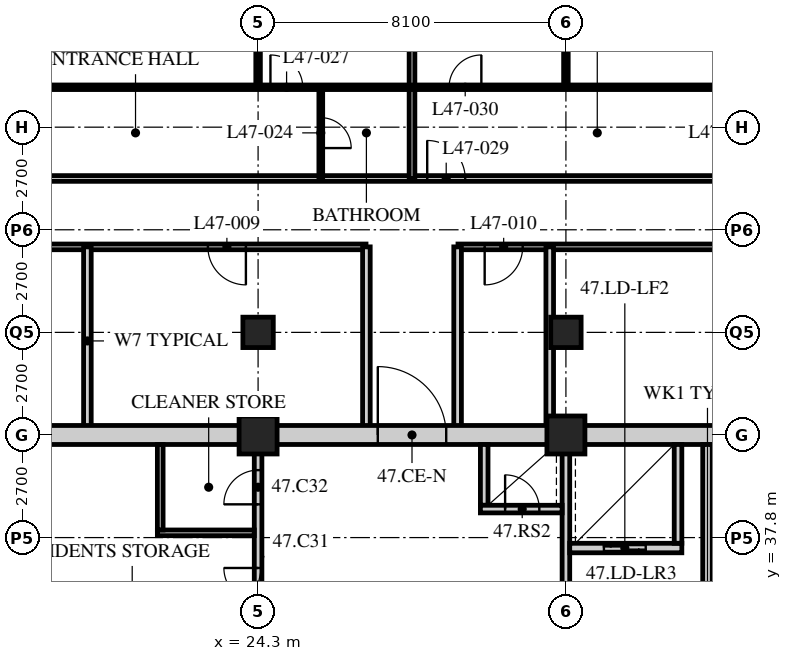
"""IFC4 building model, lengths in metres.
Left out: names, types, materials, properties, quantities, classifications, styles, units other than length and angle.
Written with IfcOpenShell. Run it as: python <this file> out.ifc"""

import sys

from ifc_helpers import new_model, si_unit, direction, frame, frame_2d, origin, origin_2d, place, context, subcontext, project, spatial, rectangle, hollow_rectangle, extrude, element, fill, save


model = new_model("IFC4")
c1 = context("Model", 3, precision=1e-05, world=origin(), true_north=direction((0.0, 1.0)))
c2 = subcontext(c1, "Body", "Model", "MODEL_VIEW")
j1 = project(units=[si_unit("LENGTHUNIT", "METRE"), si_unit("PLANEANGLEUNIT", "RADIAN")], contexts=[c1])
p1 = place(None, origin())
s1 = spatial("IfcSite", under=j1, at=p1, CompositionType="ELEMENT")
p2 = place(p1, origin())
s2 = spatial("IfcBuilding", under=s1, at=p2, CompositionType="ELEMENT")
p3 = place(p2, frame((0.0, 0.0, 184.8)))
s3 = spatial("IfcBuildingStorey", under=s2, at=p3, CompositionType="ELEMENT", Elevation=184.8)
p4 = place(p3, frame((24.3, 40.5, 0.0), z_axis=(0.0, 0.0, 1.0), x_axis=(1.0, 0.0, 0.0)))
e1 = element("IfcColumn", 1, at=p4, inside=s3, PredefinedType="COLUMN", context=c2, shape_type="SweptSolid", body=[
    extrude(hollow_rectangle(XDim=1.0, YDim=1.0, WallThickness=0.1, at=origin_2d()), origin(), (0.0, 0.0, 1.0), 3.6),
])
p5 = place(p3, frame((24.3, 43.2, 0.0), z_axis=(0.0, 0.0, 1.0), x_axis=(1.0, 0.0, 0.0)))
e2 = element("IfcColumn", 2, at=p5, inside=s3, PredefinedType="COLUMN", context=c2, shape_type="SweptSolid", body=[
    extrude(hollow_rectangle(XDim=0.8, YDim=0.8, WallThickness=0.08, at=origin_2d()), origin(), (0.0, 0.0, 1.0), 3.6),
])
p6 = place(p3, frame((32.4, 40.5, 0.0), z_axis=(0.0, 0.0, 1.0), x_axis=(1.0, 0.0, 0.0)))
e3 = element("IfcColumn", 3, at=p6, inside=s3, PredefinedType="COLUMN", context=c2, shape_type="SweptSolid", body=[
    extrude(hollow_rectangle(XDim=1.0, YDim=1.0, WallThickness=0.1, at=origin_2d()), origin(), (0.0, 0.0, 1.0), 3.6),
])
p7 = place(p3, frame((32.4, 43.2, 0.0), z_axis=(0.0, 0.0, 1.0), x_axis=(1.0, 0.0, 0.0)))
e4 = element("IfcColumn", 4, at=p7, inside=s3, PredefinedType="COLUMN", context=c2, shape_type="SweptSolid", body=[
    extrude(hollow_rectangle(XDim=0.8, YDim=0.8, WallThickness=0.08, at=origin_2d()), origin(), (0.0, 0.0, 1.0), 3.6),
])
p8 = place(p3, frame((12.15, 47.25, 0.0), z_axis=(0.0, 0.0, 1.0), x_axis=(1.0, 0.0, 0.0)))
e5 = element("IfcWall", 5, at=p8, inside=s3, PredefinedType="PARTITIONING", context=c2, shape_type="SweptSolid", body=[
    extrude(rectangle(XDim=32.4, YDim=0.15, at=frame_2d((16.2, 0.0))), origin(), (0.0, 0.0, 1.0), 3.39),
])
p9 = place(p8, frame((4.45, 0.0, 0.0)))
e6 = element("IfcOpeningElement", 6, at=p9, cuts=e5, PredefinedType="OPENING", context=c2, shape_type="SweptSolid", body=[
    extrude(rectangle(XDim=1.0, YDim=2.1, at=frame_2d((0.5, 1.05))), frame((0.0, 0.085, 0.0), z_axis=(0.0, -1.0, 0.0), x_axis=(1.0, 0.0, 0.0)), (0.0, 0.0, 1.0), 0.17),
])
p10 = place(p8, frame((16.6, 0.0, 0.0)))
e7 = element("IfcOpeningElement", 7, at=p10, cuts=e5, PredefinedType="OPENING", context=c2, shape_type="SweptSolid", body=[
    extrude(rectangle(XDim=1.0, YDim=2.1, at=frame_2d((0.5, 1.05))), frame((0.0, 0.085, 0.0), z_axis=(0.0, -1.0, 0.0), x_axis=(1.0, 0.0, 0.0)), (0.0, 0.0, 1.0), 0.17),
])
p11 = place(p8, frame((29.875, 0.0, 0.0)))
e8 = element("IfcOpeningElement", 8, at=p11, cuts=e5, PredefinedType="OPENING", context=c2, shape_type="SweptSolid", body=[
    extrude(rectangle(XDim=1.0, YDim=2.1, at=frame_2d((0.5, 1.05))), frame((0.0, 0.085, 0.0), z_axis=(0.0, -1.0, 0.0), x_axis=(1.0, 0.0, 0.0)), (0.0, 0.0, 1.0), 0.17),
])
p12 = place(p8, frame((1.525, 0.0, 0.0)))
e9 = element("IfcOpeningElement", 9, at=p12, cuts=e5, PredefinedType="OPENING", context=c2, shape_type="SweptSolid", body=[
    extrude(rectangle(XDim=1.0, YDim=2.1, at=frame_2d((0.5, 1.05))), frame((0.0, 0.085, 0.0), z_axis=(0.0, -1.0, 0.0), x_axis=(1.0, 0.0, 0.0)), (0.0, 0.0, 1.0), 0.17),
])
p13 = place(p3, frame((42.75, 45.45, 0.0), z_axis=(0.0, 0.0, 1.0), x_axis=(-1.0, 0.0, 0.0)))
e10 = element("IfcWall", 10, at=p13, inside=s3, PredefinedType="PARTITIONING", context=c2, shape_type="SweptSolid", body=[
    extrude(rectangle(XDim=13.19, YDim=0.15, at=frame_2d((6.595, 0.0))), origin(), (0.0, 0.0, 1.0), 3.39),
])
p14 = place(p13, frame((11.488, 0.0, 0.0)))
e11 = element("IfcOpeningElement", 11, at=p14, cuts=e10, PredefinedType="OPENING", context=c2, shape_type="SweptSolid", body=[
    extrude(rectangle(XDim=1.0, YDim=2.1, at=frame_2d((0.5, 1.05))), frame((0.0, 0.085, 0.0), z_axis=(0.0, -1.0, 0.0), x_axis=(1.0, 0.0, 0.0)), (0.0, 0.0, 1.0), 0.17),
])
p15 = place(p13, frame((4.888, 0.0, 0.0)))
e12 = element("IfcOpeningElement", 12, at=p15, cuts=e10, PredefinedType="OPENING", context=c2, shape_type="SweptSolid", body=[
    extrude(rectangle(XDim=1.0, YDim=2.1, at=frame_2d((0.5, 1.05))), frame((0.0, 0.085, 0.0), z_axis=(0.0, -1.0, 0.0), x_axis=(1.0, 0.0, 0.0)), (0.0, 0.0, 1.0), 0.17),
])
p16 = place(p3, frame((27.14, 45.45, 0.0), z_axis=(0.0, 0.0, 1.0), x_axis=(-1.0, 0.0, 0.0)))
e13 = element("IfcWall", 13, at=p16, inside=s3, PredefinedType="PARTITIONING", context=c2, shape_type="SweptSolid", body=[
    extrude(rectangle(XDim=13.19, YDim=0.15, at=frame_2d((6.595, 0.0))), origin(), (0.0, 0.0, 1.0), 3.39),
])
p17 = place(p16, frame((9.761, 0.0, 0.0)))
e14 = element("IfcOpeningElement", 14, at=p17, cuts=e13, PredefinedType="OPENING", context=c2, shape_type="SweptSolid", body=[
    extrude(rectangle(XDim=1.0, YDim=2.1, at=frame_2d((0.5, 1.05))), frame((0.0, 0.085, 0.0), z_axis=(0.0, -1.0, 0.0), x_axis=(1.0, 0.0, 0.0)), (0.0, 0.0, 1.0), 0.17),
])
p18 = place(p16, frame((3.161, 0.0, 0.0)))
e15 = element("IfcOpeningElement", 15, at=p18, cuts=e13, PredefinedType="OPENING", context=c2, shape_type="SweptSolid", body=[
    extrude(rectangle(XDim=1.0, YDim=2.1, at=frame_2d((0.5, 1.05))), frame((0.0, 0.085, 0.0), z_axis=(0.0, -1.0, 0.0), x_axis=(1.0, 0.0, 0.0)), (0.0, 0.0, 1.0), 0.17),
])
p19 = place(p3, frame((19.809, 45.45, 0.0), z_axis=(0.0, 0.0, 1.0), x_axis=(0.0, -1.0, 0.0)))
e16 = element("IfcWall", 16, at=p19, inside=s3, PredefinedType="SOLIDWALL", context=c2, shape_type="SweptSolid", body=[
    extrude(rectangle(XDim=4.95, YDim=0.2, at=frame_2d((2.475, 0.0))), origin(), (0.0, 0.0, 1.0), 3.39),
])
p20 = place(p3, frame((31.974, 45.45, 0.0), z_axis=(0.0, 0.0, 1.0), x_axis=(0.0, -1.0, 0.0)))
e17 = element("IfcWall", 17, at=p20, inside=s3, PredefinedType="SOLIDWALL", context=c2, shape_type="SweptSolid", body=[
    extrude(rectangle(XDim=4.95, YDim=0.2, at=frame_2d((2.475, 0.0))), origin(), (0.0, 0.0, 1.0), 2.69),
])
for number, where, z_axis, x_axis in (
    (18, (27.15, 40.5, 0.0), (0.0, 0.0, 1.0), (0.0, 1.0, 0.0)),
    (19, (29.55, 40.5, 0.0), (0.0, 0.0, 1.0), (0.0, 1.0, 0.0)),
):
    element("IfcWall", number, at=place(p3, frame(where, z_axis=z_axis, x_axis=x_axis)), inside=s3, PredefinedType="SOLIDWALL", context=c2, shape_type="SweptSolid", body=[
        extrude(rectangle(XDim=4.95, YDim=0.2, at=frame_2d((2.475, 0.0))), origin(), (0.0, 0.0, 1.0), 3.39),
    ])
p21 = place(p3, frame((25.95, 47.25, 0.0), z_axis=(0.0, 0.0, 1.0), x_axis=(0.0, 1.0, 0.0)))
e20 = element("IfcWall", 20, at=p21, inside=s3, PredefinedType="PARTITIONING", context=c2, shape_type="SweptSolid", body=[
    extrude(rectangle(XDim=2.4, YDim=0.1, at=frame_2d((1.2, 0.0))), origin(), (0.0, 0.0, 1.0), 3.39),
])
p22 = place(p21, frame((0.8, 0.0, 0.0)))
e21 = element("IfcOpeningElement", 21, at=p22, cuts=e20, PredefinedType="OPENING", context=c2, shape_type="SweptSolid", body=[
    extrude(rectangle(XDim=0.8, YDim=2.1, at=frame_2d((0.4, 1.05))), frame((0.0, 0.06, 0.0), z_axis=(0.0, -1.0, 0.0), x_axis=(1.0, 0.0, 0.0)), (0.0, 0.0, 1.0), 0.12),
])
p23 = place(p3, frame((24.3, 49.65, 0.0), z_axis=(0.0, 0.0, 1.0), x_axis=(0.0, 1.0, 0.0)))
e22 = element("IfcWall", 22, at=p23, inside=s3, PredefinedType="PARTITIONING", context=c2, shape_type="SweptSolid", body=[
    extrude(rectangle(XDim=9.45, YDim=0.12, at=frame_2d((4.725, 0.0))), origin(), (0.0, 0.0, 1.0), 2.778),
])
p24 = place(p3, frame((28.35, 47.25, 0.0), z_axis=(0.0, 0.0, 1.0), x_axis=(0.0, 1.0, 0.0)))
e23 = element("IfcWall", 23, at=p24, inside=s3, PredefinedType="PARTITIONING", context=c2, shape_type="SweptSolid", body=[
    extrude(rectangle(XDim=11.85, YDim=0.15, at=frame_2d((5.925, 0.0))), origin(), (0.0, 0.0, 1.0), 3.39),
])
p25 = place(p3, frame((8.15, 49.65, 0.0), z_axis=(0.0, 0.0, 1.0), x_axis=(1.0, 0.0, 0.0)))
e24 = element("IfcWall", 24, at=p25, inside=s3, PredefinedType="PARTITIONING", context=c2, shape_type="SweptSolid", body=[
    extrude(rectangle(XDim=40.4, YDim=0.12, at=frame_2d((20.2, 0.0))), origin(), (0.0, 0.0, 1.0), 3.39),
])
p26 = place(p25, frame((9.025, 0.0, 0.0)))
e25 = element("IfcOpeningElement", 25, at=p26, cuts=e24, PredefinedType="OPENING", context=c2, shape_type="SweptSolid", body=[
    extrude(rectangle(XDim=0.85, YDim=2.1, at=frame_2d((0.425, 1.05))), frame((0.0, 0.07, 0.0), z_axis=(0.0, -1.0, 0.0), x_axis=(1.0, 0.0, 0.0)), (0.0, 0.0, 1.0), 0.14),
])
p27 = place(p25, frame((16.475, 0.0, 0.0)))
e26 = element("IfcOpeningElement", 26, at=p27, cuts=e24, PredefinedType="OPENING", context=c2, shape_type="SweptSolid", body=[
    extrude(rectangle(XDim=0.85, YDim=2.1, at=frame_2d((0.425, 1.05))), frame((0.0, 0.07, 0.0), z_axis=(0.0, -1.0, 0.0), x_axis=(1.0, 0.0, 0.0)), (0.0, 0.0, 1.0), 0.14),
])
p28 = place(p25, frame((21.175, 0.0, 0.0)))
e27 = element("IfcOpeningElement", 27, at=p28, cuts=e24, PredefinedType="OPENING", context=c2, shape_type="SweptSolid", body=[
    extrude(rectangle(XDim=0.85, YDim=2.1, at=frame_2d((0.425, 1.05))), frame((0.0, 0.07, 0.0), z_axis=(0.0, -1.0, 0.0), x_axis=(1.0, 0.0, 0.0)), (0.0, 0.0, 1.0), 0.14),
])
p29 = place(p25, frame((28.625, 0.0, 0.0)))
e28 = element("IfcOpeningElement", 28, at=p29, cuts=e24, PredefinedType="OPENING", context=c2, shape_type="SweptSolid", body=[
    extrude(rectangle(XDim=0.85, YDim=2.1, at=frame_2d((0.425, 1.05))), frame((0.0, 0.07, 0.0), z_axis=(0.0, -1.0, 0.0), x_axis=(1.0, 0.0, 0.0)), (0.0, 0.0, 1.0), 0.14),
])
p30 = place(p25, frame((32.825, 0.0, 0.0)))
e29 = element("IfcOpeningElement", 29, at=p30, cuts=e24, PredefinedType="OPENING", context=c2, shape_type="SweptSolid", body=[
    extrude(rectangle(XDim=0.85, YDim=2.1, at=frame_2d((0.425, 1.05))), frame((0.0, 0.07, 0.0), z_axis=(0.0, -1.0, 0.0), x_axis=(1.0, 0.0, 0.0)), (0.0, 0.0, 1.0), 0.14),
])
p31 = place(p25, frame((36.675, 0.0, 0.0)))
e30 = element("IfcOpeningElement", 30, at=p31, cuts=e24, PredefinedType="OPENING", context=c2, shape_type="SweptSolid", body=[
    extrude(rectangle(XDim=0.85, YDim=2.1, at=frame_2d((0.425, 1.05))), frame((0.0, 0.07, 0.0), z_axis=(0.0, -1.0, 0.0), x_axis=(1.0, 0.0, 0.0)), (0.0, 0.0, 1.0), 0.14),
])
p32 = place(p25, frame((6.725, 0.0, 0.0)))
e31 = element("IfcOpeningElement", 31, at=p32, cuts=e24, PredefinedType="OPENING", context=c2, shape_type="SweptSolid", body=[
    extrude(rectangle(XDim=0.85, YDim=2.1, at=frame_2d((0.425, 1.05))), frame((0.0, 0.07, 0.0), z_axis=(0.0, -1.0, 0.0), x_axis=(1.0, 0.0, 0.0)), (0.0, 0.0, 1.0), 0.14),
])
p33 = place(p25, frame((2.875, 0.0, 0.0)))
e32 = element("IfcOpeningElement", 32, at=p33, cuts=e24, PredefinedType="OPENING", context=c2, shape_type="SweptSolid", body=[
    extrude(rectangle(XDim=0.85, YDim=2.1, at=frame_2d((0.425, 1.05))), frame((0.0, 0.07, 0.0), z_axis=(0.0, -1.0, 0.0), x_axis=(1.0, 0.0, 0.0)), (0.0, 0.0, 1.0), 0.14),
])
p34 = place(p3, frame((32.4, 49.65, 0.0), z_axis=(0.0, 0.0, 1.0), x_axis=(0.0, 1.0, 0.0)))
e33 = element("IfcWall", 33, at=p34, inside=s3, PredefinedType="PARTITIONING", context=c2, shape_type="SweptSolid", body=[
    extrude(rectangle(XDim=1.25, YDim=0.12, at=frame_2d((0.625, 0.0))), origin(), (0.0, 0.0, 1.0), 2.778),
])
p35 = place(p3, frame((15.95, 40.5, 0.0), z_axis=(0.0, 0.0, 1.0), x_axis=(1.0, 0.0, 0.0)))
e34 = element("IfcWall", 34, at=p35, inside=s3, PredefinedType="SOLIDWALL", context=c2, shape_type="SweptSolid", body=[
    extrude(rectangle(XDim=24.8, YDim=0.5, at=frame_2d((12.4, 0.0))), origin(), (0.0, 0.0, 1.0), 2.74),
])
p36 = place(p35, frame((11.5, 0.0, 0.0)))
e35 = element("IfcOpeningElement", 35, at=p36, cuts=e34, PredefinedType="OPENING", context=c2, shape_type="SweptSolid", body=[
    extrude(rectangle(XDim=1.8, YDim=2.4, at=frame_2d((0.9, 1.2))), frame((0.0, 0.26, 0.0), z_axis=(0.0, -1.0, 0.0), x_axis=(1.0, 0.0, 0.0)), (0.0, 0.0, 1.0), 0.52),
])
p37 = place(p3, frame((32.4, 32.5, 0.0), z_axis=(0.0, 0.0, 1.0), x_axis=(0.0, 1.0, 0.0)))
e36 = element("IfcWall", 36, at=p37, inside=s3, PredefinedType="SOLIDWALL", context=c2, shape_type="SweptSolid", body=[
    extrude(rectangle(XDim=7.75, YDim=0.2, at=frame_2d((3.875, 0.0))), origin(), (0.0, 0.0, 1.0), 2.778),
])
p38 = place(p37, frame((1.9, 0.0, 0.0)))
e37 = element("IfcOpeningElement", 37, at=p38, cuts=e36, PredefinedType="OPENING", context=c2, shape_type="SweptSolid", body=[
    extrude(rectangle(XDim=1.2, YDim=2.1, at=frame_2d((0.6, 1.05))), frame((0.0, 0.11, 0.0), z_axis=(0.0, -1.0, 0.0), x_axis=(1.0, 0.0, 0.0)), (0.0, 0.0, 1.0), 0.22),
])
p39 = place(p3, frame((36.125, 32.5, 0.0), z_axis=(0.0, 0.0, 1.0), x_axis=(0.0, 1.0, 0.0)))
e38 = element("IfcWall", 38, at=p39, inside=s3, PredefinedType="SOLIDWALL", context=c2, shape_type="SweptSolid", body=[
    extrude(rectangle(XDim=7.75, YDim=0.25, at=frame_2d((3.875, 0.0))), origin(), (0.0, 0.0, 1.0), 3.39),
])
p40 = place(p39, frame((0.45, 0.0, 0.0)))
e39 = element("IfcOpeningElement", 39, at=p40, cuts=e38, PredefinedType="OPENING", context=c2, shape_type="SweptSolid", body=[
    extrude(rectangle(XDim=1.2, YDim=2.1, at=frame_2d((0.6, 1.05))), frame((0.0, 0.135, 0.0), z_axis=(0.0, -1.0, 0.0), x_axis=(1.0, 0.0, 0.0)), (0.0, 0.0, 1.0), 0.27),
])
p41 = place(p3, frame((32.5, 37.525, 0.0), z_axis=(0.0, 0.0, 1.0), x_axis=(1.0, 0.0, 0.0)))
e40 = element("IfcWall", 40, at=p41, inside=s3, PredefinedType="SOLIDWALL", context=c2, shape_type="SweptSolid", body=[
    extrude(rectangle(XDim=2.95, YDim=0.25, at=frame_2d((1.475, 0.0))), origin(), (0.0, 0.0, 1.0), 3.39),
])
p42 = place(p41, frame((0.9, 0.0, 0.0)))
e41 = element("IfcOpeningElement", 41, at=p42, cuts=e40, PredefinedType="OPENING", context=c2, shape_type="SweptSolid", body=[
    extrude(rectangle(XDim=1.1, YDim=2.4, at=frame_2d((0.55, 1.2))), frame((0.0, 0.135, 0.0), z_axis=(0.0, -1.0, 0.0), x_axis=(1.0, 0.0, 0.0)), (0.0, 0.0, 1.0), 0.27),
])
p43 = place(p3, frame((35.35, 37.65, 0.0), z_axis=(0.0, 0.0, 1.0), x_axis=(0.0, 1.0, 0.0)))
e42 = element("IfcWall", 42, at=p43, inside=s3, PredefinedType="SOLIDWALL", context=c2, shape_type="SweptSolid", body=[
    extrude(rectangle(XDim=2.6, YDim=0.2, at=frame_2d((1.3, 0.0))), origin(), (0.0, 0.0, 1.0), 3.39),
])
p44 = place(p3, frame((30.25, 38.65, 0.0), z_axis=(0.0, 0.0, 1.0), x_axis=(0.0, 1.0, 0.0)))
e43 = element("IfcWall", 43, at=p44, inside=s3, PredefinedType="SOLIDWALL", context=c2, shape_type="SweptSolid", body=[
    extrude(rectangle(XDim=1.6, YDim=0.2, at=frame_2d((0.8, 0.0))), origin(), (0.0, 0.0, 1.0), 3.39),
])
p45 = place(p3, frame((30.15, 38.55, 0.0), z_axis=(0.0, 0.0, 1.0), x_axis=(1.0, 0.0, 0.0)))
e44 = element("IfcWall", 44, at=p45, inside=s3, PredefinedType="SOLIDWALL", context=c2, shape_type="SweptSolid", body=[
    extrude(rectangle(XDim=2.15, YDim=0.2, at=frame_2d((1.075, 0.0))), origin(), (0.0, 0.0, 1.0), 3.39),
])
p46 = place(p45, frame((0.65, 0.0, 0.0)))
e45 = element("IfcOpeningElement", 45, at=p46, cuts=e44, PredefinedType="OPENING", context=c2, shape_type="SweptSolid", body=[
    extrude(rectangle(XDim=0.9, YDim=2.1, at=frame_2d((0.45, 1.05))), frame((0.0, 0.11, 0.0), z_axis=(0.0, -1.0, 0.0), x_axis=(1.0, 0.0, 0.0)), (0.0, 0.0, 1.0), 0.22),
])
p47 = place(p3, frame((24.3, 32.5, 0.0), z_axis=(0.0, 0.0, 1.0), x_axis=(0.0, 1.0, 0.0)))
e46 = element("IfcWall", 46, at=p47, inside=s3, PredefinedType="PARTITIONING", context=c2, shape_type="SweptSolid", body=[
    extrude(rectangle(XDim=7.75, YDim=0.2, at=frame_2d((3.875, 0.0))), origin(), (0.0, 0.0, 1.0), 2.778),
])
p48 = place(p47, frame((0.8, 0.0, 0.0)))
e47 = element("IfcOpeningElement", 47, at=p48, cuts=e46, PredefinedType="OPENING", context=c2, shape_type="SweptSolid", body=[
    extrude(rectangle(XDim=1.0, YDim=2.1, at=frame_2d((0.5, 1.05))), frame((0.0, 0.11, 0.0), z_axis=(0.0, -1.0, 0.0), x_axis=(1.0, 0.0, 0.0)), (0.0, 0.0, 1.0), 0.22),
])
p49 = place(p47, frame((3.6, 0.0, 0.0)))
e48 = element("IfcOpeningElement", 48, at=p49, cuts=e46, PredefinedType="OPENING", context=c2, shape_type="SweptSolid", body=[
    extrude(rectangle(XDim=0.9, YDim=2.1, at=frame_2d((0.45, 1.05))), frame((0.0, 0.11, 0.0), z_axis=(0.0, -1.0, 0.0), x_axis=(1.0, 0.0, 0.0)), (0.0, 0.0, 1.0), 0.22),
])
p50 = place(p47, frame((6.175, 0.0, 0.0)))
e49 = element("IfcOpeningElement", 49, at=p50, cuts=e46, PredefinedType="OPENING", context=c2, shape_type="SweptSolid", body=[
    extrude(rectangle(XDim=0.9, YDim=2.1, at=frame_2d((0.45, 1.05))), frame((0.0, 0.11, 0.0), z_axis=(0.0, -1.0, 0.0), x_axis=(1.0, 0.0, 0.0)), (0.0, 0.0, 1.0), 0.22),
])
p51 = place(p3, frame((21.65, 37.925, 0.0), z_axis=(0.0, 0.0, 1.0), x_axis=(1.0, 0.0, 0.0)))
e50 = element("IfcWall", 50, at=p51, inside=s3, PredefinedType="PARTITIONING", context=c2, shape_type="SweptSolid", body=[
    extrude(rectangle(XDim=2.55, YDim=0.15, at=frame_2d((1.275, 0.0))), origin(), (0.0, 0.0, 1.0), 3.39),
])
p52 = place(p3, frame((21.725, 38.0, 0.0), z_axis=(0.0, 0.0, 1.0), x_axis=(0.0, 1.0, 0.0)))
e51 = element("IfcWall", 51, at=p52, inside=s3, PredefinedType="PARTITIONING", context=c2, shape_type="SweptSolid", body=[
    extrude(rectangle(XDim=2.25, YDim=0.15, at=frame_2d((1.125, 0.0))), origin(), (0.0, 0.0, 1.0), 3.39),
])
p53 = place(p18, origin())
e52 = element("IfcDoor", 52, at=p53, inside=s3, OperationType="SINGLE_SWING_LEFT", PredefinedType="DOOR", context=c2, shape_type="SweptSolid", body=[
    extrude(rectangle(XDim=1.0, YDim=2.1, at=frame_2d((0.5, 1.05))), frame((0.0, 0.025, 0.0), z_axis=(0.0, -1.0, 0.0), x_axis=(1.0, 0.0, 0.0)), (0.0, 0.0, 1.0), 0.05),
])
fill(e15, e52)
p54 = place(p14, origin())
e53 = element("IfcDoor", 53, at=p54, inside=s3, OperationType="SINGLE_SWING_RIGHT", PredefinedType="DOOR", context=c2, shape_type="SweptSolid", body=[
    extrude(rectangle(XDim=1.0, YDim=2.1, at=frame_2d((0.5, 1.05))), frame((0.0, 0.025, 0.0), z_axis=(0.0, -1.0, 0.0), x_axis=(1.0, 0.0, 0.0)), (0.0, 0.0, 1.0), 0.05),
])
fill(e11, e53)
p55 = place(p22, origin())
e54 = element("IfcDoor", 54, at=p55, inside=s3, OperationType="SINGLE_SWING_RIGHT", PredefinedType="DOOR", context=c2, shape_type="SweptSolid", body=[
    extrude(rectangle(XDim=0.8, YDim=2.1, at=frame_2d((0.4, 1.05))), frame((0.0, 0.025, 0.0), z_axis=(0.0, -1.0, 0.0), x_axis=(1.0, 0.0, 0.0)), (0.0, 0.0, 1.0), 0.05),
])
fill(e21, e54)
p56 = place(p27, origin())
e55 = element("IfcDoor", 55, at=p56, inside=s3, OperationType="SINGLE_SWING_LEFT", PredefinedType="DOOR", context=c2, shape_type="SweptSolid", body=[
    extrude(rectangle(XDim=0.85, YDim=2.1, at=frame_2d((0.425, 1.05))), frame((0.0, 0.025, 0.0), z_axis=(0.0, -1.0, 0.0), x_axis=(1.0, 0.0, 0.0)), (0.0, 0.0, 1.0), 0.05),
])
fill(e26, e55)
p57 = place(p10, origin())
e56 = element("IfcDoor", 56, at=p57, inside=s3, OperationType="SINGLE_SWING_LEFT", PredefinedType="DOOR", context=c2, shape_type="SweptSolid", body=[
    extrude(rectangle(XDim=1.0, YDim=2.1, at=frame_2d((0.5, 1.05))), frame((0.0, 0.025, 0.0), z_axis=(0.0, -1.0, 0.0), x_axis=(1.0, 0.0, 0.0)), (0.0, 0.0, 1.0), 0.05),
])
fill(e7, e56)
p58 = place(p28, origin())
e57 = element("IfcDoor", 57, at=p58, inside=s3, OperationType="SINGLE_SWING_RIGHT", PredefinedType="DOOR", context=c2, shape_type="SweptSolid", body=[
    extrude(rectangle(XDim=0.85, YDim=2.1, at=frame_2d((0.425, 1.05))), frame((0.0, 0.025, 0.0), z_axis=(0.0, -1.0, 0.0), x_axis=(1.0, 0.0, 0.0)), (0.0, 0.0, 1.0), 0.05),
])
fill(e27, e57)
p59 = place(p49, origin())
e58 = element("IfcDoor", 58, at=p59, inside=s3, OperationType="SINGLE_SWING_RIGHT", PredefinedType="DOOR", context=c2, shape_type="SweptSolid", body=[
    extrude(rectangle(XDim=0.9, YDim=2.1, at=frame_2d((0.45, 1.05))), frame((0.0, 0.025, 0.0), z_axis=(0.0, -1.0, 0.0), x_axis=(1.0, 0.0, 0.0)), (0.0, 0.0, 1.0), 0.05),
])
fill(e48, e58)
p60 = place(p50, origin())
e59 = element("IfcDoor", 59, at=p60, inside=s3, OperationType="SINGLE_SWING_LEFT", PredefinedType="DOOR", context=c2, shape_type="SweptSolid", body=[
    extrude(rectangle(XDim=0.9, YDim=2.1, at=frame_2d((0.45, 1.05))), frame((0.0, 0.025, 0.0), z_axis=(0.0, -1.0, 0.0), x_axis=(1.0, 0.0, 0.0)), (0.0, 0.0, 1.0), 0.05),
])
fill(e49, e59)
p61 = place(p46, origin())
e60 = element("IfcDoor", 60, at=p61, inside=s3, OperationType="SINGLE_SWING_LEFT", PredefinedType="DOOR", context=c2, shape_type="SweptSolid", body=[
    extrude(rectangle(XDim=0.9, YDim=2.1, at=frame_2d((0.45, 1.05))), frame((0.0, 0.025, 0.0), z_axis=(0.0, -1.0, 0.0), x_axis=(1.0, 0.0, 0.0)), (0.0, 0.0, 1.0), 0.05),
])
fill(e45, e60)
p62 = place(p42, origin())
e61 = element("IfcDoor", 61, at=p62, inside=s3, OperationType="DOUBLE_DOOR_SLIDING", PredefinedType="DOOR", context=c2, shape_type="SweptSolid", body=[
    extrude(rectangle(XDim=1.1, YDim=2.4, at=frame_2d((0.55, 1.2))), frame((0.0, 0.025, 0.0), z_axis=(0.0, -1.0, 0.0), x_axis=(1.0, 0.0, 0.0)), (0.0, 0.0, 1.0), 0.05),
])
fill(e41, e61)
p63 = place(p36, origin())
e62 = element("IfcDoor", 62, at=p63, inside=s3, OperationType="DOUBLE_DOOR_SINGLE_SWING", PredefinedType="DOOR", context=c2, shape_type="SweptSolid", body=[
    extrude(rectangle(XDim=1.8, YDim=2.4, at=frame_2d((0.9, 1.2))), frame((0.0, 0.025, 0.0), z_axis=(0.0, -1.0, 0.0), x_axis=(1.0, 0.0, 0.0)), (0.0, 0.0, 1.0), 0.05),
])
fill(e35, e62)
save(model, sys.argv[1])
